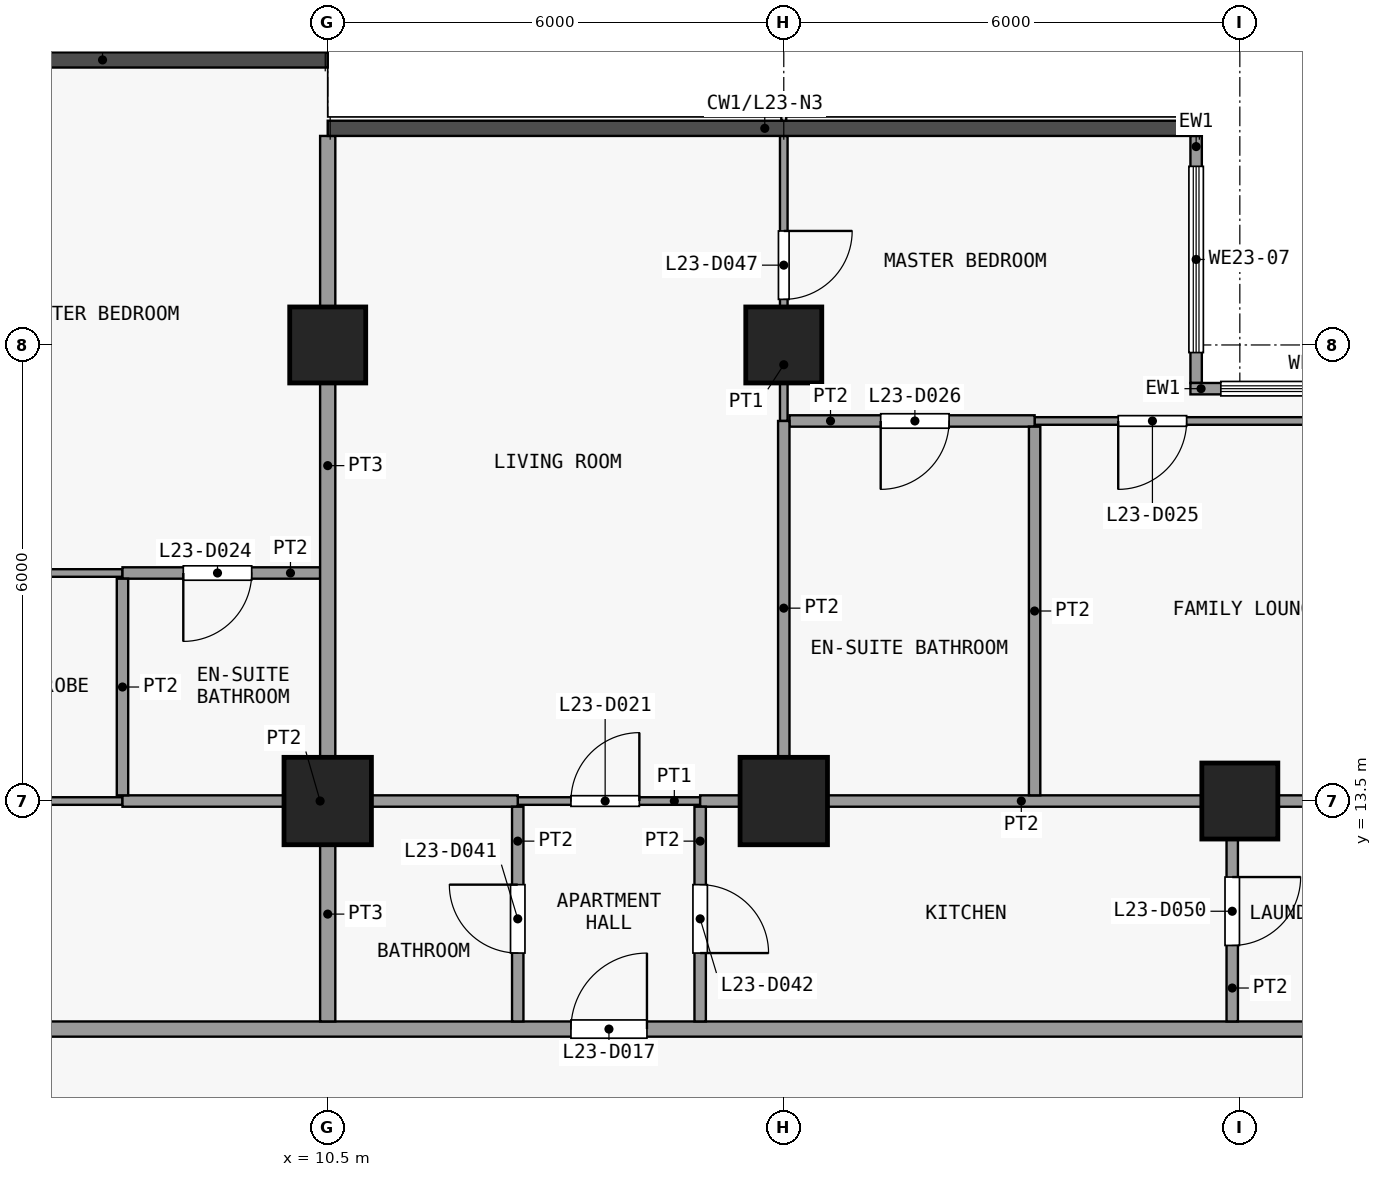
"""IFC4 building model, lengths in metres.
Left out: names, types, materials, properties, quantities, classifications, styles, units other than length and angle.
Written with IfcOpenShell. Run it as: python <this file> out.ifc"""

import sys

from ifc_helpers import new_model, si_unit, direction, frame, frame_2d, origin, origin_2d, place, context, subcontext, project, spatial, rectangle, extrude, element, fill, save


model = new_model("IFC4")
c1 = context("Model", 3, precision=1e-05, world=origin(), true_north=direction((0.0, 1.0)))
c2 = subcontext(c1, "Body", "Model", "MODEL_VIEW")
j1 = project(units=[si_unit("LENGTHUNIT", "METRE"), si_unit("PLANEANGLEUNIT", "RADIAN")], contexts=[c1])
p1 = place(None, origin())
s1 = spatial("IfcSite", under=j1, at=p1, CompositionType="ELEMENT")
p2 = place(p1, origin())
s2 = spatial("IfcBuilding", under=s1, at=p2, CompositionType="ELEMENT")
p3 = place(p2, frame((0.0, 0.0, 95.5)))
s3 = spatial("IfcBuildingStorey", under=s2, at=p3, CompositionType="ELEMENT", Elevation=95.5)
p4 = place(p3, frame((10.5, 13.5, 0.0), z_axis=(0.0, 0.0, 1.0), x_axis=(1.0, 0.0, 0.0)))
e1 = element("IfcColumn", 1, at=p4, inside=s3, PredefinedType="COLUMN", context=c2, shape_type="SweptSolid", body=[
    extrude(rectangle(XDim=1.15, YDim=1.15, at=origin_2d()), origin(), (0.0, 0.0, 1.0), 3.6),
])
p5 = place(p3, frame((10.5, 19.5, 0.0), z_axis=(0.0, 0.0, 1.0), x_axis=(1.0, 0.0, 0.0)))
e2 = element("IfcColumn", 2, at=p5, inside=s3, PredefinedType="COLUMN", context=c2, shape_type="SweptSolid", body=[
    extrude(rectangle(XDim=1.0, YDim=1.0, at=origin_2d()), origin(), (0.0, 0.0, 1.0), 3.6),
])
p6 = place(p3, frame((16.5, 13.5, 0.0), z_axis=(0.0, 0.0, 1.0), x_axis=(1.0, 0.0, 0.0)))
e3 = element("IfcColumn", 3, at=p6, inside=s3, PredefinedType="COLUMN", context=c2, shape_type="SweptSolid", body=[
    extrude(rectangle(XDim=1.15, YDim=1.15, at=origin_2d()), origin(), (0.0, 0.0, 1.0), 3.6),
])
for number, where, z_axis, x_axis in (
    (4, (16.5, 19.5, 0.0), (0.0, 0.0, 1.0), (1.0, 0.0, 0.0)),
    (5, (22.5, 13.5, 0.0), (0.0, 0.0, 1.0), (1.0, 0.0, 0.0)),
):
    element("IfcColumn", number, at=place(p3, frame(where, z_axis=z_axis, x_axis=x_axis)), inside=s3, PredefinedType="COLUMN", context=c2, shape_type="SweptSolid", body=[
        extrude(rectangle(XDim=1.0, YDim=1.0, at=origin_2d()), origin(), (0.0, 0.0, 1.0), 3.6),
    ])
p7 = place(p3, frame((21.925, 22.25, 0.0), z_axis=(0.0, 0.0, 1.0), x_axis=(0.0, -1.0, 0.0)))
e6 = element("IfcWall", 6, at=p7, inside=s3, PredefinedType="SOLIDWALL", context=c2, shape_type="SweptSolid", body=[
    extrude(rectangle(XDim=3.25, YDim=0.15, at=frame_2d((1.625, 0.0))), origin(), (0.0, 0.0, 1.0), 3.3),
])
p8 = place(p7, frame((0.4, 0.0, 0.9)))
e7 = element("IfcOpeningElement", 7, at=p8, cuts=e6, PredefinedType="OPENING", context=c2, shape_type="SweptSolid", body=[
    extrude(rectangle(XDim=2.45, YDim=2.4, at=frame_2d((1.225, 1.2))), frame((0.0, 0.085, 0.0), z_axis=(0.0, -1.0, 0.0), x_axis=(1.0, 0.0, 0.0)), (0.0, 0.0, 1.0), 0.17),
])
p9 = place(p3, frame((21.85, 18.925, 0.0), z_axis=(0.0, 0.0, 1.0), x_axis=(1.0, 0.0, 0.0)))
e8 = element("IfcWall", 8, at=p9, inside=s3, PredefinedType="SOLIDWALL", context=c2, shape_type="SweptSolid", body=[
    extrude(rectangle(XDim=3.65, YDim=0.15, at=frame_2d((1.825, 0.0))), origin(), (0.0, 0.0, 1.0), 3.3),
])
p10 = place(p9, frame((0.4, 0.0, 0.9)))
e9 = element("IfcOpeningElement", 9, at=p10, cuts=e8, PredefinedType="OPENING", context=c2, shape_type="SweptSolid", body=[
    extrude(rectangle(XDim=2.85, YDim=2.4, at=frame_2d((1.425, 1.2))), frame((0.0, 0.085, 0.0), z_axis=(0.0, -1.0, 0.0), x_axis=(1.0, 0.0, 0.0)), (0.0, 0.0, 1.0), 0.17),
])
p11 = place(p3, frame((-23.85, 10.5, 0.0), z_axis=(0.0, 0.0, 1.0), x_axis=(1.0, 0.0, 0.0)))
e10 = element("IfcWall", 10, at=p11, inside=s3, PredefinedType="PARTITIONING", context=c2, shape_type="SweptSolid", body=[
    extrude(rectangle(XDim=47.7, YDim=0.2, at=frame_2d((23.85, 0.0))), origin(), (0.0, 0.0, 1.0), 3.3),
])
p12 = place(p11, frame((3.05, 0.0, 0.0)))
e11 = element("IfcOpeningElement", 11, at=p12, cuts=e10, PredefinedType="OPENING", context=c2, shape_type="SweptSolid", body=[
    extrude(rectangle(XDim=1.0, YDim=2.1, at=frame_2d((0.5, 1.05))), frame((0.0, 0.11, 0.0), z_axis=(0.0, -1.0, 0.0), x_axis=(1.0, 0.0, 0.0)), (0.0, 0.0, 1.0), 0.22),
])
p13 = place(p11, frame((11.55, 0.0, 0.0)))
e12 = element("IfcOpeningElement", 12, at=p13, cuts=e10, PredefinedType="OPENING", context=c2, shape_type="SweptSolid", body=[
    extrude(rectangle(XDim=1.0, YDim=2.1, at=frame_2d((0.5, 1.05))), frame((0.0, 0.11, 0.0), z_axis=(0.0, -1.0, 0.0), x_axis=(1.0, 0.0, 0.0)), (0.0, 0.0, 1.0), 0.22),
])
p14 = place(p11, frame((37.55, 0.0, 0.0)))
e13 = element("IfcOpeningElement", 13, at=p14, cuts=e10, PredefinedType="OPENING", context=c2, shape_type="SweptSolid", body=[
    extrude(rectangle(XDim=1.0, YDim=2.1, at=frame_2d((0.5, 1.05))), frame((0.0, 0.11, 0.0), z_axis=(0.0, -1.0, 0.0), x_axis=(1.0, 0.0, 0.0)), (0.0, 0.0, 1.0), 0.22),
])
p15 = place(p3, frame((0.067, 13.5, 0.0), z_axis=(0.0, 0.0, 1.0), x_axis=(1.0, 0.0, 0.0)))
e14 = element("IfcWall", 14, at=p15, inside=s3, PredefinedType="PARTITIONING", context=c2, shape_type="SweptSolid", body=[
    extrude(rectangle(XDim=7.733, YDim=0.1, at=frame_2d((3.867, 0.0))), origin(), (0.0, 0.0, 1.0), 3.3),
])
p16 = place(p15, frame((1.8, 0.0, 0.0)))
e15 = element("IfcOpeningElement", 15, at=p16, cuts=e14, PredefinedType="OPENING", context=c2, shape_type="SweptSolid", body=[
    extrude(rectangle(XDim=0.9, YDim=2.1, at=frame_2d((0.45, 1.05))), frame((0.0, 0.06, 0.0), z_axis=(0.0, -1.0, 0.0), x_axis=(1.0, 0.0, 0.0)), (0.0, 0.0, 1.0), 0.12),
])
p17 = place(p3, frame((13.0, 13.5, 0.0), z_axis=(0.0, 0.0, 1.0), x_axis=(1.0, 0.0, 0.0)))
e16 = element("IfcWall", 16, at=p17, inside=s3, PredefinedType="PARTITIONING", context=c2, shape_type="SweptSolid", body=[
    extrude(rectangle(XDim=2.4, YDim=0.1, at=frame_2d((1.2, 0.0))), origin(), (0.0, 0.0, 1.0), 3.3),
])
p18 = place(p17, frame((0.7, 0.0, 0.0)))
e17 = element("IfcOpeningElement", 17, at=p18, cuts=e16, PredefinedType="OPENING", context=c2, shape_type="SweptSolid", body=[
    extrude(rectangle(XDim=0.9, YDim=2.1, at=frame_2d((0.45, 1.05))), frame((0.0, 0.06, 0.0), z_axis=(0.0, -1.0, 0.0), x_axis=(1.0, 0.0, 0.0)), (0.0, 0.0, 1.0), 0.12),
])
p19 = place(p3, frame((7.8, 13.5, 0.0), z_axis=(0.0, 0.0, 1.0), x_axis=(1.0, 0.0, 0.0)))
e18 = element("IfcWall", 18, at=p19, inside=s3, PredefinedType="PARTITIONING", context=c2, shape_type="SweptSolid", body=[
    extrude(rectangle(XDim=5.2, YDim=0.15, at=frame_2d((2.6, 0.0))), origin(), (0.0, 0.0, 1.0), 3.3),
])
p20 = place(p3, frame((15.4, 13.5, 0.0), z_axis=(0.0, 0.0, 1.0), x_axis=(1.0, 0.0, 0.0)))
e19 = element("IfcWall", 19, at=p20, inside=s3, PredefinedType="PARTITIONING", context=c2, shape_type="SweptSolid", body=[
    extrude(rectangle(XDim=8.45, YDim=0.15, at=frame_2d((4.225, 0.0))), origin(), (0.0, 0.0, 1.0), 3.3),
])
p21 = place(p3, frame((4.55, 16.5, 0.0), z_axis=(0.0, 0.0, 1.0), x_axis=(1.0, 0.0, 0.0)))
e20 = element("IfcWall", 20, at=p21, inside=s3, PredefinedType="PARTITIONING", context=c2, shape_type="SweptSolid", body=[
    extrude(rectangle(XDim=3.25, YDim=0.1, at=frame_2d((1.625, 0.0))), origin(), (0.0, 0.0, 1.0), 3.3),
])
p22 = place(p21, frame((1.2, 0.0, 0.0)))
e21 = element("IfcOpeningElement", 21, at=p22, cuts=e20, PredefinedType="OPENING", context=c2, shape_type="SweptSolid", body=[
    extrude(rectangle(XDim=0.9, YDim=2.1, at=frame_2d((0.45, 1.05))), frame((0.0, 0.06, 0.0), z_axis=(0.0, -1.0, 0.0), x_axis=(1.0, 0.0, 0.0)), (0.0, 0.0, 1.0), 0.12),
])
p23 = place(p3, frame((7.8, 16.5, 0.0), z_axis=(0.0, 0.0, 1.0), x_axis=(1.0, 0.0, 0.0)))
e22 = element("IfcWall", 22, at=p23, inside=s3, PredefinedType="PARTITIONING", context=c2, shape_type="SweptSolid", body=[
    extrude(rectangle(XDim=2.6, YDim=0.15, at=frame_2d((1.3, 0.0))), origin(), (0.0, 0.0, 1.0), 3.3),
])
p24 = place(p23, frame((0.8, 0.0, 0.0)))
e23 = element("IfcOpeningElement", 23, at=p24, cuts=e22, PredefinedType="OPENING", context=c2, shape_type="SweptSolid", body=[
    extrude(rectangle(XDim=0.9, YDim=2.1, at=frame_2d((0.45, 1.05))), frame((0.0, 0.085, 0.0), z_axis=(0.0, -1.0, 0.0), x_axis=(1.0, 0.0, 0.0)), (0.0, 0.0, 1.0), 0.17),
])
p25 = place(p3, frame((19.8, 18.5, 0.0), z_axis=(0.0, 0.0, 1.0), x_axis=(1.0, 0.0, 0.0)))
e24 = element("IfcWall", 24, at=p25, inside=s3, PredefinedType="PARTITIONING", context=c2, shape_type="SweptSolid", body=[
    extrude(rectangle(XDim=5.45, YDim=0.1, at=frame_2d((2.725, 0.0))), origin(), (0.0, 0.0, 1.0), 3.3),
])
p26 = place(p25, frame((1.1, 0.0, 0.0)))
e25 = element("IfcOpeningElement", 25, at=p26, cuts=e24, PredefinedType="OPENING", context=c2, shape_type="SweptSolid", body=[
    extrude(rectangle(XDim=0.9, YDim=2.1, at=frame_2d((0.45, 1.05))), frame((0.0, 0.06, 0.0), z_axis=(0.0, -1.0, 0.0), x_axis=(1.0, 0.0, 0.0)), (0.0, 0.0, 1.0), 0.12),
])
p27 = place(p3, frame((16.575, 18.5, 0.0), z_axis=(0.0, 0.0, 1.0), x_axis=(1.0, 0.0, 0.0)))
e26 = element("IfcWall", 26, at=p27, inside=s3, PredefinedType="PARTITIONING", context=c2, shape_type="SweptSolid", body=[
    extrude(rectangle(XDim=3.225, YDim=0.15, at=frame_2d((1.613, 0.0))), origin(), (0.0, 0.0, 1.0), 3.3),
])
p28 = place(p27, frame((1.2, 0.0, 0.0)))
e27 = element("IfcOpeningElement", 27, at=p28, cuts=e26, PredefinedType="OPENING", context=c2, shape_type="SweptSolid", body=[
    extrude(rectangle(XDim=0.9, YDim=2.1, at=frame_2d((0.45, 1.05))), frame((0.0, 0.085, 0.0), z_axis=(0.0, -1.0, 0.0), x_axis=(1.0, 0.0, 0.0)), (0.0, 0.0, 1.0), 0.17),
])
p29 = place(p3, frame((7.8, 13.575, 0.0), z_axis=(0.0, 0.0, 1.0), x_axis=(0.0, 1.0, 0.0)))
e28 = element("IfcWall", 28, at=p29, inside=s3, PredefinedType="PARTITIONING", context=c2, shape_type="SweptSolid", body=[
    extrude(rectangle(XDim=2.85, YDim=0.15, at=frame_2d((1.425, 0.0))), origin(), (0.0, 0.0, 1.0), 3.3),
])
p30 = place(p3, frame((10.5, 10.6, 0.0), z_axis=(0.0, 0.0, 1.0), x_axis=(0.0, 1.0, 0.0)))
e29 = element("IfcWall", 29, at=p30, inside=s3, PredefinedType="PARTITIONING", context=c2, shape_type="SweptSolid", body=[
    extrude(rectangle(XDim=2.825, YDim=0.2, at=frame_2d((1.413, 0.0))), origin(), (0.0, 0.0, 1.0), 3.3),
])
p31 = place(p3, frame((10.5, 13.575, 0.0), z_axis=(0.0, 0.0, 1.0), x_axis=(0.0, 1.0, 0.0)))
e30 = element("IfcWall", 30, at=p31, inside=s3, PredefinedType="PARTITIONING", context=c2, shape_type="SweptSolid", body=[
    extrude(rectangle(XDim=8.675, YDim=0.2, at=frame_2d((4.337, 0.0))), origin(), (0.0, 0.0, 1.0), 3.3),
])
p32 = place(p3, frame((13.0, 10.6, 0.0), z_axis=(0.0, 0.0, 1.0), x_axis=(0.0, 1.0, 0.0)))
e31 = element("IfcWall", 31, at=p32, inside=s3, PredefinedType="PARTITIONING", context=c2, shape_type="SweptSolid", body=[
    extrude(rectangle(XDim=2.825, YDim=0.15, at=frame_2d((1.413, 0.0))), origin(), (0.0, 0.0, 1.0), 3.3),
])
p33 = place(p32, frame((0.9, 0.0, 0.0)))
e32 = element("IfcOpeningElement", 32, at=p33, cuts=e31, PredefinedType="OPENING", context=c2, shape_type="SweptSolid", body=[
    extrude(rectangle(XDim=0.9, YDim=2.1, at=frame_2d((0.45, 1.05))), frame((0.0, 0.085, 0.0), z_axis=(0.0, -1.0, 0.0), x_axis=(1.0, 0.0, 0.0)), (0.0, 0.0, 1.0), 0.17),
])
p34 = place(p3, frame((15.4, 10.6, 0.0), z_axis=(0.0, 0.0, 1.0), x_axis=(0.0, 1.0, 0.0)))
e33 = element("IfcWall", 33, at=p34, inside=s3, PredefinedType="PARTITIONING", context=c2, shape_type="SweptSolid", body=[
    extrude(rectangle(XDim=2.825, YDim=0.15, at=frame_2d((1.413, 0.0))), origin(), (0.0, 0.0, 1.0), 3.3),
])
p35 = place(p34, frame((0.9, 0.0, 0.0)))
e34 = element("IfcOpeningElement", 34, at=p35, cuts=e33, PredefinedType="OPENING", context=c2, shape_type="SweptSolid", body=[
    extrude(rectangle(XDim=0.9, YDim=2.1, at=frame_2d((0.45, 1.05))), frame((0.0, 0.085, 0.0), z_axis=(0.0, -1.0, 0.0), x_axis=(1.0, 0.0, 0.0)), (0.0, 0.0, 1.0), 0.17),
])
p36 = place(p3, frame((16.5, 18.5, 0.0), z_axis=(0.0, 0.0, 1.0), x_axis=(0.0, 1.0, 0.0)))
e35 = element("IfcWall", 35, at=p36, inside=s3, PredefinedType="PARTITIONING", context=c2, shape_type="SweptSolid", body=[
    extrude(rectangle(XDim=3.75, YDim=0.1, at=frame_2d((1.875, 0.0))), origin(), (0.0, 0.0, 1.0), 3.3),
])
p37 = place(p36, frame((1.6, 0.0, 0.0)))
e36 = element("IfcOpeningElement", 36, at=p37, cuts=e35, PredefinedType="OPENING", context=c2, shape_type="SweptSolid", body=[
    extrude(rectangle(XDim=0.9, YDim=2.1, at=frame_2d((0.45, 1.05))), frame((0.0, 0.06, 0.0), z_axis=(0.0, -1.0, 0.0), x_axis=(1.0, 0.0, 0.0)), (0.0, 0.0, 1.0), 0.12),
])
p38 = place(p3, frame((16.5, 13.575, 0.0), z_axis=(0.0, 0.0, 1.0), x_axis=(0.0, 1.0, 0.0)))
e37 = element("IfcWall", 37, at=p38, inside=s3, PredefinedType="PARTITIONING", context=c2, shape_type="SweptSolid", body=[
    extrude(rectangle(XDim=4.925, YDim=0.15, at=frame_2d((2.462, 0.0))), origin(), (0.0, 0.0, 1.0), 3.3),
])
p39 = place(p3, frame((19.8, 13.575, 0.0), z_axis=(0.0, 0.0, 1.0), x_axis=(0.0, 1.0, 0.0)))
e38 = element("IfcWall", 38, at=p39, inside=s3, PredefinedType="PARTITIONING", context=c2, shape_type="SweptSolid", body=[
    extrude(rectangle(XDim=4.85, YDim=0.15, at=frame_2d((2.425, 0.0))), origin(), (0.0, 0.0, 1.0), 3.3),
])
p40 = place(p3, frame((22.4, 10.6, 0.0), z_axis=(0.0, 0.0, 1.0), x_axis=(0.0, 1.0, 0.0)))
e39 = element("IfcWall", 39, at=p40, inside=s3, PredefinedType="PARTITIONING", context=c2, shape_type="SweptSolid", body=[
    extrude(rectangle(XDim=2.825, YDim=0.15, at=frame_2d((1.413, 0.0))), origin(), (0.0, 0.0, 1.0), 3.3),
])
p41 = place(p40, frame((1.0, 0.0, 0.0)))
e40 = element("IfcOpeningElement", 40, at=p41, cuts=e39, PredefinedType="OPENING", context=c2, shape_type="SweptSolid", body=[
    extrude(rectangle(XDim=0.9, YDim=2.1, at=frame_2d((0.45, 1.05))), frame((0.0, 0.085, 0.0), z_axis=(0.0, -1.0, 0.0), x_axis=(1.0, 0.0, 0.0)), (0.0, 0.0, 1.0), 0.17),
])
p42 = place(p8, origin())
e41 = element("IfcWindow", 41, at=p42, inside=s3, PartitioningType="SINGLE_PANEL", PredefinedType="WINDOW", context=c2, shape_type="SweptSolid", body=[
    extrude(rectangle(XDim=2.45, YDim=2.4, at=frame_2d((1.225, 1.2))), frame((0.0, 0.03, 0.0), z_axis=(0.0, -1.0, 0.0), x_axis=(1.0, 0.0, 0.0)), (0.0, 0.0, 1.0), 0.06),
])
fill(e7, e41)
p43 = place(p10, origin())
e42 = element("IfcWindow", 42, at=p43, inside=s3, PartitioningType="SINGLE_PANEL", PredefinedType="WINDOW", context=c2, shape_type="SweptSolid", body=[
    extrude(rectangle(XDim=2.85, YDim=2.4, at=frame_2d((1.425, 1.2))), frame((0.0, 0.03, 0.0), z_axis=(0.0, -1.0, 0.0), x_axis=(1.0, 0.0, 0.0)), (0.0, 0.0, 1.0), 0.06),
])
fill(e9, e42)
p44 = place(p14, origin())
e43 = element("IfcDoor", 43, at=p44, inside=s3, OperationType="SINGLE_SWING_LEFT", PredefinedType="DOOR", context=c2, shape_type="SweptSolid", body=[
    extrude(rectangle(XDim=1.0, YDim=2.1, at=frame_2d((0.5, 1.05))), frame((0.0, 0.025, 0.0), z_axis=(0.0, -1.0, 0.0), x_axis=(1.0, 0.0, 0.0)), (0.0, 0.0, 1.0), 0.05),
])
fill(e13, e43)
p45 = place(p18, origin())
e44 = element("IfcDoor", 44, at=p45, inside=s3, OperationType="SINGLE_SWING_LEFT", PredefinedType="DOOR", context=c2, shape_type="SweptSolid", body=[
    extrude(rectangle(XDim=0.9, YDim=2.1, at=frame_2d((0.45, 1.05))), frame((0.0, 0.025, 0.0), z_axis=(0.0, -1.0, 0.0), x_axis=(1.0, 0.0, 0.0)), (0.0, 0.0, 1.0), 0.05),
])
fill(e17, e44)
p46 = place(p24, origin())
e45 = element("IfcDoor", 45, at=p46, inside=s3, OperationType="SINGLE_SWING_LEFT", PredefinedType="DOOR", context=c2, shape_type="SweptSolid", body=[
    extrude(rectangle(XDim=0.9, YDim=2.1, at=frame_2d((0.45, 1.05))), frame((0.0, 0.025, 0.0), z_axis=(0.0, -1.0, 0.0), x_axis=(1.0, 0.0, 0.0)), (0.0, 0.0, 1.0), 0.05),
])
fill(e23, e45)
p47 = place(p26, origin())
e46 = element("IfcDoor", 46, at=p47, inside=s3, OperationType="SINGLE_SWING_LEFT", PredefinedType="DOOR", context=c2, shape_type="SweptSolid", body=[
    extrude(rectangle(XDim=0.9, YDim=2.1, at=frame_2d((0.45, 1.05))), frame((0.0, 0.025, 0.0), z_axis=(0.0, -1.0, 0.0), x_axis=(1.0, 0.0, 0.0)), (0.0, 0.0, 1.0), 0.05),
])
fill(e25, e46)
p48 = place(p28, origin())
e47 = element("IfcDoor", 47, at=p48, inside=s3, OperationType="SINGLE_SWING_LEFT", PredefinedType="DOOR", context=c2, shape_type="SweptSolid", body=[
    extrude(rectangle(XDim=0.9, YDim=2.1, at=frame_2d((0.45, 1.05))), frame((0.0, 0.025, 0.0), z_axis=(0.0, -1.0, 0.0), x_axis=(1.0, 0.0, 0.0)), (0.0, 0.0, 1.0), 0.05),
])
fill(e27, e47)
p49 = place(p33, origin())
e48 = element("IfcDoor", 48, at=p49, inside=s3, OperationType="SINGLE_SWING_LEFT", PredefinedType="DOOR", context=c2, shape_type="SweptSolid", body=[
    extrude(rectangle(XDim=0.9, YDim=2.1, at=frame_2d((0.45, 1.05))), frame((0.0, 0.025, 0.0), z_axis=(0.0, -1.0, 0.0), x_axis=(1.0, 0.0, 0.0)), (0.0, 0.0, 1.0), 0.05),
])
fill(e32, e48)
p50 = place(p35, origin())
e49 = element("IfcDoor", 49, at=p50, inside=s3, OperationType="SINGLE_SWING_LEFT", PredefinedType="DOOR", context=c2, shape_type="SweptSolid", body=[
    extrude(rectangle(XDim=0.9, YDim=2.1, at=frame_2d((0.45, 1.05))), frame((0.0, 0.025, 0.0), z_axis=(0.0, -1.0, 0.0), x_axis=(1.0, 0.0, 0.0)), (0.0, 0.0, 1.0), 0.05),
])
fill(e34, e49)
p51 = place(p37, origin())
e50 = element("IfcDoor", 50, at=p51, inside=s3, OperationType="SINGLE_SWING_RIGHT", PredefinedType="DOOR", context=c2, shape_type="SweptSolid", body=[
    extrude(rectangle(XDim=0.9, YDim=2.1, at=frame_2d((0.45, 1.05))), frame((0.0, 0.025, 0.0), z_axis=(0.0, -1.0, 0.0), x_axis=(1.0, 0.0, 0.0)), (0.0, 0.0, 1.0), 0.05),
])
fill(e36, e50)
p52 = place(p41, origin())
e51 = element("IfcDoor", 51, at=p52, inside=s3, OperationType="SINGLE_SWING_RIGHT", PredefinedType="DOOR", context=c2, shape_type="SweptSolid", body=[
    extrude(rectangle(XDim=0.9, YDim=2.1, at=frame_2d((0.45, 1.05))), frame((0.0, 0.025, 0.0), z_axis=(0.0, -1.0, 0.0), x_axis=(1.0, 0.0, 0.0)), (0.0, 0.0, 1.0), 0.05),
])
fill(e40, e51)
save(model, sys.argv[1])
